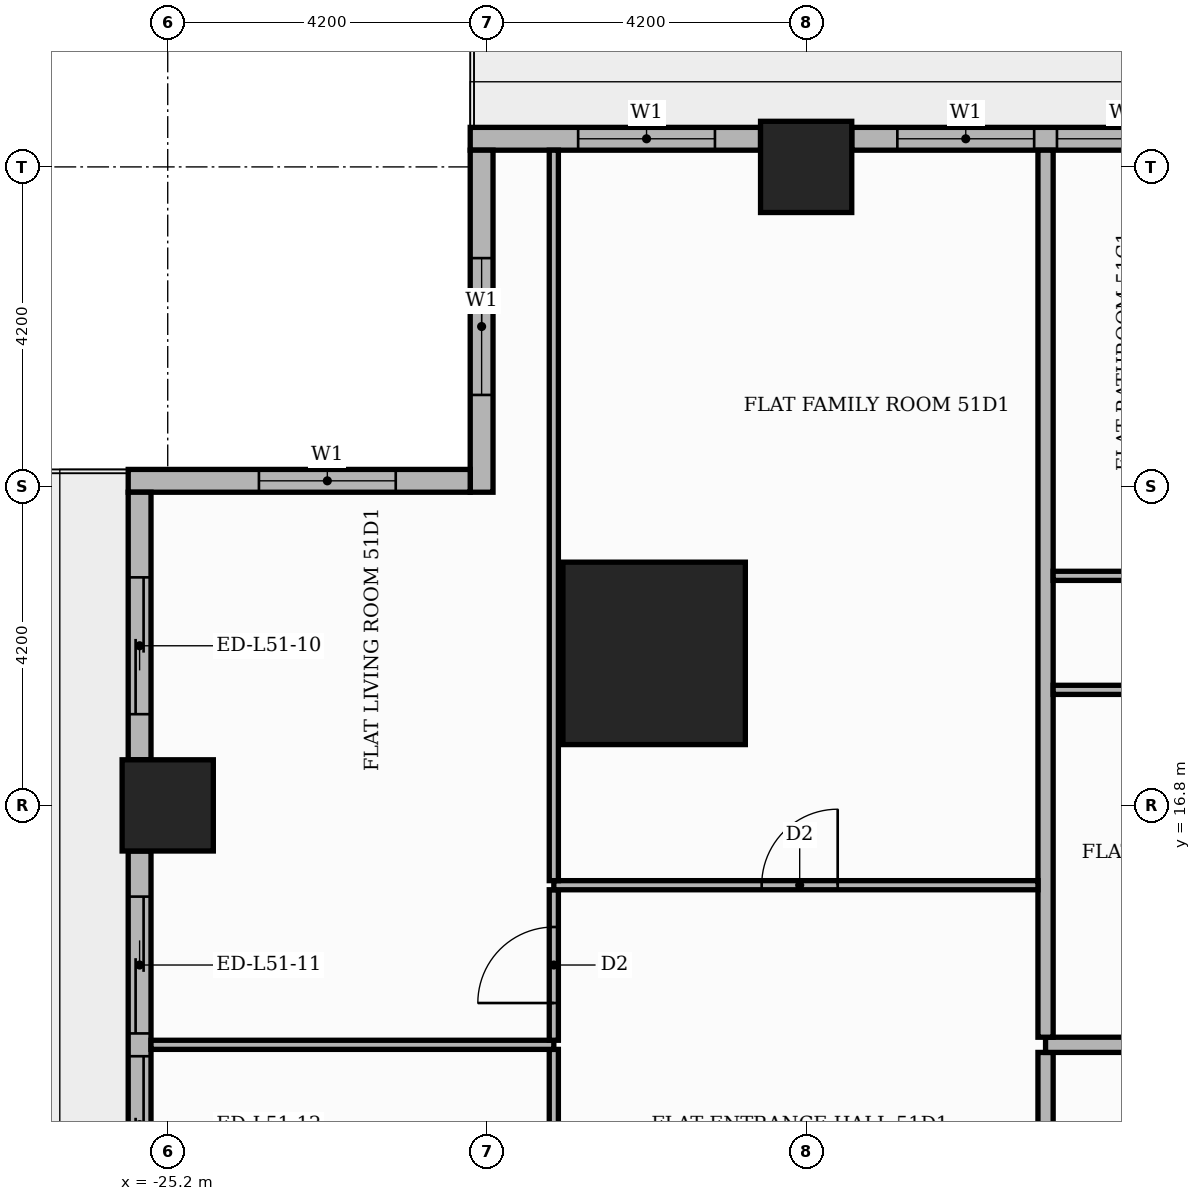
"""IFC4 building model, lengths in metres.
Left out: names, types, materials, properties, quantities, classifications, styles, units other than length and angle.
Written with IfcOpenShell. Run it as: python <this file> out.ifc"""

import sys

from ifc_helpers import new_model, si_unit, direction, frame, frame_2d, origin, origin_2d, place, context, subcontext, project, spatial, rectangle, extrude, element, fill, save


model = new_model("IFC4")
c1 = context("Model", 3, precision=1e-05, world=origin(), true_north=direction((0.0, 1.0)))
c2 = subcontext(c1, "Body", "Model", "MODEL_VIEW")
j1 = project(units=[si_unit("LENGTHUNIT", "METRE"), si_unit("PLANEANGLEUNIT", "RADIAN")], contexts=[c1])
p1 = place(None, origin())
s1 = spatial("IfcSite", under=j1, at=p1, CompositionType="ELEMENT")
p2 = place(p1, origin())
s2 = spatial("IfcBuilding", under=s1, at=p2, CompositionType="ELEMENT")
p3 = place(p2, frame((0.0, 0.0, 215.7)))
s3 = spatial("IfcBuildingStorey", under=s2, at=p3, CompositionType="ELEMENT", Elevation=215.7)
p4 = place(p3, frame((-18.8, 18.8, 0.0), z_axis=(0.0, 0.0, 1.0), x_axis=(1.0, 0.0, 0.0)))
e1 = element("IfcColumn", 1, at=p4, inside=s3, PredefinedType="COLUMN", context=c2, shape_type="SweptSolid", body=[
    extrude(rectangle(XDim=2.4, YDim=2.4, at=origin_2d()), origin(), (0.0, 0.0, 1.0), 3.9),
])
for number, where, z_axis, x_axis in (
    (2, (-16.8, 25.2, 0.0), (0.0, 0.0, 1.0), (1.0, 0.0, 0.0)),
    (3, (-25.2, 16.8, 0.0), (0.0, 0.0, 1.0), (1.0, 0.0, 0.0)),
):
    element("IfcColumn", number, at=place(p3, frame(where, z_axis=z_axis, x_axis=x_axis)), inside=s3, PredefinedType="COLUMN", context=c2, shape_type="SweptSolid", body=[
        extrude(rectangle(XDim=1.2, YDim=1.2, at=origin_2d()), origin(), (0.0, 0.0, 1.0), 3.9),
    ])
p5 = place(p3, frame((-9.0, 25.57, 0.0), z_axis=(0.0, 0.0, 1.0), x_axis=(-1.0, 0.0, 0.0)))
e4 = element("IfcWall", 4, at=p5, inside=s3, PredefinedType="STANDARD", context=c2, shape_type="SweptSolid", body=[
    extrude(rectangle(XDim=7.2, YDim=0.3, at=frame_2d((3.6, 0.0))), origin(), (0.0, 0.0, 1.0), 3.48),
])
p6 = place(p5, frame((0.6, 0.0, 0.9)))
e5 = element("IfcOpeningElement", 5, at=p6, cuts=e4, PredefinedType="OPENING", context=c2, shape_type="SweptSolid", body=[
    extrude(rectangle(XDim=1.8, YDim=2.1, at=frame_2d((0.9, 1.05))), frame((0.0, 0.16, 0.0), z_axis=(0.0, -1.0, 0.0), x_axis=(1.0, 0.0, 0.0)), (0.0, 0.0, 1.0), 0.32),
])
p7 = place(p5, frame((2.7, 0.0, 0.9)))
e6 = element("IfcOpeningElement", 6, at=p7, cuts=e4, PredefinedType="OPENING", context=c2, shape_type="SweptSolid", body=[
    extrude(rectangle(XDim=1.8, YDim=2.1, at=frame_2d((0.9, 1.05))), frame((0.0, 0.16, 0.0), z_axis=(0.0, -1.0, 0.0), x_axis=(1.0, 0.0, 0.0)), (0.0, 0.0, 1.0), 0.32),
])
p8 = place(p5, frame((4.8, 0.0, 0.9)))
e7 = element("IfcOpeningElement", 7, at=p8, cuts=e4, PredefinedType="OPENING", context=c2, shape_type="SweptSolid", body=[
    extrude(rectangle(XDim=1.8, YDim=2.1, at=frame_2d((0.9, 1.05))), frame((0.0, 0.16, 0.0), z_axis=(0.0, -1.0, 0.0), x_axis=(1.0, 0.0, 0.0)), (0.0, 0.0, 1.0), 0.32),
])
p9 = place(p3, frame((-17.4, 25.57, 0.0), z_axis=(0.0, 0.0, 1.0), x_axis=(-1.0, 0.0, 0.0)))
e8 = element("IfcWall", 8, at=p9, inside=s3, PredefinedType="STANDARD", context=c2, shape_type="SweptSolid", body=[
    extrude(rectangle(XDim=3.82, YDim=0.3, at=frame_2d((1.91, 0.0))), origin(), (0.0, 0.0, 1.0), 3.48),
])
p10 = place(p9, frame((0.6, 0.0, 0.9)))
e9 = element("IfcOpeningElement", 9, at=p10, cuts=e8, PredefinedType="OPENING", context=c2, shape_type="SweptSolid", body=[
    extrude(rectangle(XDim=1.8, YDim=2.1, at=frame_2d((0.9, 1.05))), frame((0.0, 0.16, 0.0), z_axis=(0.0, -1.0, 0.0), x_axis=(1.0, 0.0, 0.0)), (0.0, 0.0, 1.0), 0.32),
])
p11 = place(p3, frame((-21.07, 25.42, 0.0), z_axis=(0.0, 0.0, 1.0), x_axis=(0.0, -1.0, 0.0)))
e10 = element("IfcWall", 10, at=p11, inside=s3, PredefinedType="STANDARD", context=c2, shape_type="SweptSolid", body=[
    extrude(rectangle(XDim=4.5, YDim=0.3, at=frame_2d((2.25, 0.0))), origin(), (0.0, 0.0, 1.0), 3.48),
])
p12 = place(p11, frame((1.42, 0.0, 0.9)))
e11 = element("IfcOpeningElement", 11, at=p12, cuts=e10, PredefinedType="OPENING", context=c2, shape_type="SweptSolid", body=[
    extrude(rectangle(XDim=1.8, YDim=2.1, at=frame_2d((0.9, 1.05))), frame((0.0, 0.16, 0.0), z_axis=(0.0, -1.0, 0.0), x_axis=(1.0, 0.0, 0.0)), (0.0, 0.0, 1.0), 0.32),
])
p13 = place(p3, frame((-21.22, 21.07, 0.0), z_axis=(0.0, 0.0, 1.0), x_axis=(-1.0, 0.0, 0.0)))
e12 = element("IfcWall", 12, at=p13, inside=s3, PredefinedType="STANDARD", context=c2, shape_type="SweptSolid", body=[
    extrude(rectangle(XDim=4.5, YDim=0.3, at=frame_2d((2.25, 0.0))), origin(), (0.0, 0.0, 1.0), 3.48),
])
p14 = place(p13, frame((0.98, 0.0, 0.9)))
e13 = element("IfcOpeningElement", 13, at=p14, cuts=e12, PredefinedType="OPENING", context=c2, shape_type="SweptSolid", body=[
    extrude(rectangle(XDim=1.8, YDim=2.1, at=frame_2d((0.9, 1.05))), frame((0.0, 0.16, 0.0), z_axis=(0.0, -1.0, 0.0), x_axis=(1.0, 0.0, 0.0)), (0.0, 0.0, 1.0), 0.32),
])
p15 = place(p3, frame((-25.57, 20.92, 0.0), z_axis=(0.0, 0.0, 1.0), x_axis=(0.0, -1.0, 0.0)))
e14 = element("IfcWall", 14, at=p15, inside=s3, PredefinedType="STANDARD", context=c2, shape_type="SweptSolid", body=[
    extrude(rectangle(XDim=3.52, YDim=0.3, at=frame_2d((1.76, 0.0))), origin(), (0.0, 0.0, 1.0), 3.48),
])
p16 = place(p15, frame((1.12, 0.0, 0.0)))
e15 = element("IfcOpeningElement", 15, at=p16, cuts=e14, PredefinedType="OPENING", context=c2, shape_type="SweptSolid", body=[
    extrude(rectangle(XDim=1.8, YDim=2.4, at=frame_2d((0.9, 1.2))), frame((0.0, 0.16, 0.0), z_axis=(0.0, -1.0, 0.0), x_axis=(1.0, 0.0, 0.0)), (0.0, 0.0, 1.0), 0.32),
])
p17 = place(p3, frame((-25.57, 16.2, 0.0), z_axis=(0.0, 0.0, 1.0), x_axis=(0.0, -1.0, 0.0)))
e16 = element("IfcWall", 16, at=p17, inside=s3, PredefinedType="STANDARD", context=c2, shape_type="SweptSolid", body=[
    extrude(rectangle(XDim=7.2, YDim=0.3, at=frame_2d((3.6, 0.0))), origin(), (0.0, 0.0, 1.0), 3.48),
])
p18 = place(p17, frame((0.6, 0.0, 0.0)))
e17 = element("IfcOpeningElement", 17, at=p18, cuts=e16, PredefinedType="OPENING", context=c2, shape_type="SweptSolid", body=[
    extrude(rectangle(XDim=1.8, YDim=2.4, at=frame_2d((0.9, 1.2))), frame((0.0, 0.16, 0.0), z_axis=(0.0, -1.0, 0.0), x_axis=(1.0, 0.0, 0.0)), (0.0, 0.0, 1.0), 0.32),
])
p19 = place(p17, frame((2.7, 0.0, 0.0)))
e18 = element("IfcOpeningElement", 18, at=p19, cuts=e16, PredefinedType="OPENING", context=c2, shape_type="SweptSolid", body=[
    extrude(rectangle(XDim=1.8, YDim=2.4, at=frame_2d((0.9, 1.2))), frame((0.0, 0.16, 0.0), z_axis=(0.0, -1.0, 0.0), x_axis=(1.0, 0.0, 0.0)), (0.0, 0.0, 1.0), 0.32),
])
p20 = place(p17, frame((4.8, 0.0, 0.9)))
e19 = element("IfcOpeningElement", 19, at=p20, cuts=e16, PredefinedType="OPENING", context=c2, shape_type="SweptSolid", body=[
    extrude(rectangle(XDim=1.8, YDim=2.1, at=frame_2d((0.9, 1.05))), frame((0.0, 0.16, 0.0), z_axis=(0.0, -1.0, 0.0), x_axis=(1.0, 0.0, 0.0)), (0.0, 0.0, 1.0), 0.32),
])
p21 = place(p3, frame((-13.65, 5.35, 0.0), z_axis=(0.0, 0.0, 1.0), x_axis=(0.0, 1.0, 0.0)))
e20 = element("IfcWall", 20, at=p21, inside=s3, PredefinedType="PARTITIONING", context=c2, shape_type="SweptSolid", body=[
    extrude(rectangle(XDim=8.2, YDim=0.2, at=frame_2d((4.1, 0.0))), origin(), (0.0, 0.0, 1.0), 3.48),
])
p22 = place(p21, frame((5.65, 0.0, 0.0)))
e21 = element("IfcOpeningElement", 21, at=p22, cuts=e20, PredefinedType="OPENING", context=c2, shape_type="SweptSolid", body=[
    extrude(rectangle(XDim=1.1, YDim=2.4, at=frame_2d((0.55, 1.2))), frame((0.0, 0.11, 0.0), z_axis=(0.0, -1.0, 0.0), x_axis=(1.0, 0.0, 0.0)), (0.0, 0.0, 1.0), 0.22),
])
p23 = place(p3, frame((-20.12, 9.51, 0.0), z_axis=(0.0, 0.0, 1.0), x_axis=(0.0, 1.0, 0.0)))
e22 = element("IfcWall", 22, at=p23, inside=s3, PredefinedType="PARTITIONING", context=c2, shape_type="SweptSolid", body=[
    extrude(rectangle(XDim=4.08, YDim=0.12, at=frame_2d((2.04, 0.0))), origin(), (0.0, 0.0, 1.0), 3.48),
])
p24 = place(p23, frame((1.59, 0.0, 0.0)))
e23 = element("IfcOpeningElement", 23, at=p24, cuts=e22, PredefinedType="OPENING", context=c2, shape_type="SweptSolid", body=[
    extrude(rectangle(XDim=0.9, YDim=2.1, at=frame_2d((0.45, 1.05))), frame((0.0, 0.07, 0.0), z_axis=(0.0, -1.0, 0.0), x_axis=(1.0, 0.0, 0.0)), (0.0, 0.0, 1.0), 0.14),
])
p25 = place(p3, frame((-25.42, 13.65, 0.0), z_axis=(0.0, 0.0, 1.0), x_axis=(1.0, 0.0, 0.0)))
e24 = element("IfcWall", 24, at=p25, inside=s3, PredefinedType="PARTITIONING", context=c2, shape_type="SweptSolid", body=[
    extrude(rectangle(XDim=5.3, YDim=0.12, at=frame_2d((2.65, 0.0))), origin(), (0.0, 0.0, 1.0), 3.48),
])
p26 = place(p3, frame((-13.65, 13.65, 0.0), z_axis=(0.0, 0.0, 1.0), x_axis=(1.0, 0.0, 0.0)))
e25 = element("IfcWall", 25, at=p26, inside=s3, PredefinedType="PARTITIONING", context=c2, shape_type="SweptSolid", body=[
    extrude(rectangle(XDim=39.07, YDim=0.2, at=frame_2d((19.535, 0.0))), origin(), (0.0, 0.0, 1.0), 3.48),
])
p27 = place(p26, frame((24.65, 0.0, 0.0)))
e26 = element("IfcOpeningElement", 26, at=p27, cuts=e25, PredefinedType="OPENING", context=c2, shape_type="SweptSolid", body=[
    extrude(rectangle(XDim=1.1, YDim=2.4, at=frame_2d((0.55, 1.2))), frame((0.0, 0.11, 0.0), z_axis=(0.0, -1.0, 0.0), x_axis=(1.0, 0.0, 0.0)), (0.0, 0.0, 1.0), 0.22),
])
p28 = place(p3, frame((-20.12, 13.71, 0.0), z_axis=(0.0, 0.0, 1.0), x_axis=(0.0, 1.0, 0.0)))
e27 = element("IfcWall", 27, at=p28, inside=s3, PredefinedType="PARTITIONING", context=c2, shape_type="SweptSolid", body=[
    extrude(rectangle(XDim=1.98, YDim=0.12, at=frame_2d((0.99, 0.0))), origin(), (0.0, 0.0, 1.0), 3.48),
])
p29 = place(p28, frame((0.49, 0.0, 0.0)))
e28 = element("IfcOpeningElement", 28, at=p29, cuts=e27, PredefinedType="OPENING", context=c2, shape_type="SweptSolid", body=[
    extrude(rectangle(XDim=1.0, YDim=2.1, at=frame_2d((0.5, 1.05))), frame((0.0, 0.07, 0.0), z_axis=(0.0, -1.0, 0.0), x_axis=(1.0, 0.0, 0.0)), (0.0, 0.0, 1.0), 0.14),
])
p30 = place(p3, frame((-13.65, 13.75, 0.0), z_axis=(0.0, 0.0, 1.0), x_axis=(0.0, 1.0, 0.0)))
e29 = element("IfcWall", 29, at=p30, inside=s3, PredefinedType="PARTITIONING", context=c2, shape_type="SweptSolid", body=[
    extrude(rectangle(XDim=11.67, YDim=0.2, at=frame_2d((5.835, 0.0))), origin(), (0.0, 0.0, 1.0), 3.48),
])
p31 = place(p3, frame((-20.12, 15.75, 0.0), z_axis=(0.0, 0.0, 1.0), x_axis=(1.0, 0.0, 0.0)))
e30 = element("IfcWall", 30, at=p31, inside=s3, PredefinedType="PARTITIONING", context=c2, shape_type="SweptSolid", body=[
    extrude(rectangle(XDim=6.37, YDim=0.12, at=frame_2d((3.185, 0.0))), origin(), (0.0, 0.0, 1.0), 3.48),
])
p32 = place(p31, frame((2.735, 0.0, 0.0)))
e31 = element("IfcOpeningElement", 31, at=p32, cuts=e30, PredefinedType="OPENING", context=c2, shape_type="SweptSolid", body=[
    extrude(rectangle(XDim=1.0, YDim=2.1, at=frame_2d((0.5, 1.05))), frame((0.0, 0.07, 0.0), z_axis=(0.0, -1.0, 0.0), x_axis=(1.0, 0.0, 0.0)), (0.0, 0.0, 1.0), 0.14),
])
p33 = place(p3, frame((-20.12, 15.81, 0.0), z_axis=(0.0, 0.0, 1.0), x_axis=(0.0, 1.0, 0.0)))
e32 = element("IfcWall", 32, at=p33, inside=s3, PredefinedType="PARTITIONING", context=c2, shape_type="SweptSolid", body=[
    extrude(rectangle(XDim=9.61, YDim=0.12, at=frame_2d((4.805, 0.0))), origin(), (0.0, 0.0, 1.0), 3.48),
])
p34 = place(p3, frame((-13.55, 18.32, 0.0), z_axis=(0.0, 0.0, 1.0), x_axis=(1.0, 0.0, 0.0)))
e33 = element("IfcWall", 33, at=p34, inside=s3, PredefinedType="PARTITIONING", context=c2, shape_type="SweptSolid", body=[
    extrude(rectangle(XDim=23.0, YDim=0.12, at=frame_2d((11.5, 0.0))), origin(), (0.0, 0.0, 1.0), 3.48),
])
p35 = place(p34, frame((19.325, 0.0, 0.0)))
e34 = element("IfcOpeningElement", 34, at=p35, cuts=e33, PredefinedType="OPENING", context=c2, shape_type="SweptSolid", body=[
    extrude(rectangle(XDim=0.9, YDim=2.1, at=frame_2d((0.45, 1.05))), frame((0.0, 0.07, 0.0), z_axis=(0.0, -1.0, 0.0), x_axis=(1.0, 0.0, 0.0)), (0.0, 0.0, 1.0), 0.14),
])
p36 = place(p34, frame((14.0, 0.0, 0.0)))
e35 = element("IfcOpeningElement", 35, at=p36, cuts=e33, PredefinedType="OPENING", context=c2, shape_type="SweptSolid", body=[
    extrude(rectangle(XDim=0.9, YDim=2.1, at=frame_2d((0.45, 1.05))), frame((0.0, 0.07, 0.0), z_axis=(0.0, -1.0, 0.0), x_axis=(1.0, 0.0, 0.0)), (0.0, 0.0, 1.0), 0.14),
])
p37 = place(p34, frame((8.975, 0.0, 0.0)))
e36 = element("IfcOpeningElement", 36, at=p37, cuts=e33, PredefinedType="OPENING", context=c2, shape_type="SweptSolid", body=[
    extrude(rectangle(XDim=0.9, YDim=2.1, at=frame_2d((0.45, 1.05))), frame((0.0, 0.07, 0.0), z_axis=(0.0, -1.0, 0.0), x_axis=(1.0, 0.0, 0.0)), (0.0, 0.0, 1.0), 0.14),
])
p38 = place(p34, frame((4.925, 0.0, 0.0)))
e37 = element("IfcOpeningElement", 37, at=p38, cuts=e33, PredefinedType="OPENING", context=c2, shape_type="SweptSolid", body=[
    extrude(rectangle(XDim=0.9, YDim=2.1, at=frame_2d((0.45, 1.05))), frame((0.0, 0.07, 0.0), z_axis=(0.0, -1.0, 0.0), x_axis=(1.0, 0.0, 0.0)), (0.0, 0.0, 1.0), 0.14),
])
p39 = place(p34, frame((1.625, 0.0, 0.0)))
e38 = element("IfcOpeningElement", 38, at=p39, cuts=e33, PredefinedType="OPENING", context=c2, shape_type="SweptSolid", body=[
    extrude(rectangle(XDim=0.9, YDim=2.1, at=frame_2d((0.45, 1.05))), frame((0.0, 0.07, 0.0), z_axis=(0.0, -1.0, 0.0), x_axis=(1.0, 0.0, 0.0)), (0.0, 0.0, 1.0), 0.14),
])
p40 = place(p3, frame((-13.55, 19.82, 0.0), z_axis=(0.0, 0.0, 1.0), x_axis=(1.0, 0.0, 0.0)))
e39 = element("IfcWall", 39, at=p40, inside=s3, PredefinedType="PARTITIONING", context=c2, shape_type="SweptSolid", body=[
    extrude(rectangle(XDim=31.15, YDim=0.12, at=frame_2d((15.575, 0.0))), origin(), (0.0, 0.0, 1.0), 3.48),
])
p41 = place(p40, frame((26.7, 0.0, 0.0)))
e40 = element("IfcOpeningElement", 40, at=p41, cuts=e39, PredefinedType="OPENING", context=c2, shape_type="SweptSolid", body=[
    extrude(rectangle(XDim=1.0, YDim=2.1, at=frame_2d((0.5, 1.05))), frame((0.0, 0.07, 0.0), z_axis=(0.0, -1.0, 0.0), x_axis=(1.0, 0.0, 0.0)), (0.0, 0.0, 1.0), 0.14),
])
p42 = place(p40, frame((20.4, 0.0, 0.0)))
e41 = element("IfcOpeningElement", 41, at=p42, cuts=e39, PredefinedType="OPENING", context=c2, shape_type="SweptSolid", body=[
    extrude(rectangle(XDim=1.0, YDim=2.1, at=frame_2d((0.5, 1.05))), frame((0.0, 0.07, 0.0), z_axis=(0.0, -1.0, 0.0), x_axis=(1.0, 0.0, 0.0)), (0.0, 0.0, 1.0), 0.14),
])
p43 = place(p40, frame((13.1, 0.0, 0.0)))
e42 = element("IfcOpeningElement", 42, at=p43, cuts=e39, PredefinedType="OPENING", context=c2, shape_type="SweptSolid", body=[
    extrude(rectangle(XDim=0.9, YDim=2.1, at=frame_2d((0.45, 1.05))), frame((0.0, 0.07, 0.0), z_axis=(0.0, -1.0, 0.0), x_axis=(1.0, 0.0, 0.0)), (0.0, 0.0, 1.0), 0.14),
])
p44 = place(p40, frame((3.65, 0.0, 0.0)))
e43 = element("IfcOpeningElement", 43, at=p44, cuts=e39, PredefinedType="OPENING", context=c2, shape_type="SweptSolid", body=[
    extrude(rectangle(XDim=0.9, YDim=2.1, at=frame_2d((0.45, 1.05))), frame((0.0, 0.07, 0.0), z_axis=(0.0, -1.0, 0.0), x_axis=(1.0, 0.0, 0.0)), (0.0, 0.0, 1.0), 0.14),
])
p45 = place(p7, origin())
e44 = element("IfcWindow", 44, at=p45, inside=s3, PartitioningType="SINGLE_PANEL", PredefinedType="WINDOW", context=c2, shape_type="SweptSolid", body=[
    extrude(rectangle(XDim=1.8, YDim=2.1, at=frame_2d((0.9, 1.05))), frame((0.0, 0.03, 0.0), z_axis=(0.0, -1.0, 0.0), x_axis=(1.0, 0.0, 0.0)), (0.0, 0.0, 1.0), 0.06),
])
fill(e6, e44)
p46 = place(p8, origin())
e45 = element("IfcWindow", 45, at=p46, inside=s3, PartitioningType="SINGLE_PANEL", PredefinedType="WINDOW", context=c2, shape_type="SweptSolid", body=[
    extrude(rectangle(XDim=1.8, YDim=2.1, at=frame_2d((0.9, 1.05))), frame((0.0, 0.03, 0.0), z_axis=(0.0, -1.0, 0.0), x_axis=(1.0, 0.0, 0.0)), (0.0, 0.0, 1.0), 0.06),
])
fill(e7, e45)
p47 = place(p10, origin())
e46 = element("IfcWindow", 46, at=p47, inside=s3, PartitioningType="SINGLE_PANEL", PredefinedType="WINDOW", context=c2, shape_type="SweptSolid", body=[
    extrude(rectangle(XDim=1.8, YDim=2.1, at=frame_2d((0.9, 1.05))), frame((0.0, 0.03, 0.0), z_axis=(0.0, -1.0, 0.0), x_axis=(1.0, 0.0, 0.0)), (0.0, 0.0, 1.0), 0.06),
])
fill(e9, e46)
p48 = place(p12, origin())
e47 = element("IfcWindow", 47, at=p48, inside=s3, PartitioningType="SINGLE_PANEL", PredefinedType="WINDOW", context=c2, shape_type="SweptSolid", body=[
    extrude(rectangle(XDim=1.8, YDim=2.1, at=frame_2d((0.9, 1.05))), frame((0.0, 0.03, 0.0), z_axis=(0.0, -1.0, 0.0), x_axis=(1.0, 0.0, 0.0)), (0.0, 0.0, 1.0), 0.06),
])
fill(e11, e47)
p49 = place(p14, origin())
e48 = element("IfcWindow", 48, at=p49, inside=s3, PartitioningType="SINGLE_PANEL", PredefinedType="WINDOW", context=c2, shape_type="SweptSolid", body=[
    extrude(rectangle(XDim=1.8, YDim=2.1, at=frame_2d((0.9, 1.05))), frame((0.0, 0.03, 0.0), z_axis=(0.0, -1.0, 0.0), x_axis=(1.0, 0.0, 0.0)), (0.0, 0.0, 1.0), 0.06),
])
fill(e13, e48)
p50 = place(p16, origin())
e49 = element("IfcDoor", 49, at=p50, inside=s3, OperationType="SLIDING_TO_RIGHT", PredefinedType="DOOR", context=c2, shape_type="SweptSolid", body=[
    extrude(rectangle(XDim=1.8, YDim=2.4, at=frame_2d((0.9, 1.2))), frame((0.0, 0.025, 0.0), z_axis=(0.0, -1.0, 0.0), x_axis=(1.0, 0.0, 0.0)), (0.0, 0.0, 1.0), 0.05),
])
fill(e15, e49)
p51 = place(p18, origin())
e50 = element("IfcDoor", 50, at=p51, inside=s3, OperationType="SLIDING_TO_LEFT", PredefinedType="DOOR", context=c2, shape_type="SweptSolid", body=[
    extrude(rectangle(XDim=1.8, YDim=2.4, at=frame_2d((0.9, 1.2))), frame((0.0, 0.025, 0.0), z_axis=(0.0, -1.0, 0.0), x_axis=(1.0, 0.0, 0.0)), (0.0, 0.0, 1.0), 0.05),
])
fill(e17, e50)
p52 = place(p19, origin())
e51 = element("IfcDoor", 51, at=p52, inside=s3, OperationType="SLIDING_TO_RIGHT", PredefinedType="DOOR", context=c2, shape_type="SweptSolid", body=[
    extrude(rectangle(XDim=1.8, YDim=2.4, at=frame_2d((0.9, 1.2))), frame((0.0, 0.025, 0.0), z_axis=(0.0, -1.0, 0.0), x_axis=(1.0, 0.0, 0.0)), (0.0, 0.0, 1.0), 0.05),
])
fill(e18, e51)
p53 = place(p32, origin())
e52 = element("IfcDoor", 52, at=p53, inside=s3, OperationType="SINGLE_SWING_RIGHT", PredefinedType="DOOR", context=c2, shape_type="SweptSolid", body=[
    extrude(rectangle(XDim=1.0, YDim=2.1, at=frame_2d((0.5, 1.05))), frame((0.0, 0.025, 0.0), z_axis=(0.0, -1.0, 0.0), x_axis=(1.0, 0.0, 0.0)), (0.0, 0.0, 1.0), 0.05),
])
fill(e31, e52)
p54 = place(p29, origin())
e53 = element("IfcDoor", 53, at=p54, inside=s3, OperationType="SINGLE_SWING_LEFT", PredefinedType="DOOR", context=c2, shape_type="SweptSolid", body=[
    extrude(rectangle(XDim=1.0, YDim=2.1, at=frame_2d((0.5, 1.05))), frame((0.0, 0.025, 0.0), z_axis=(0.0, -1.0, 0.0), x_axis=(1.0, 0.0, 0.0)), (0.0, 0.0, 1.0), 0.05),
])
fill(e28, e53)
save(model, sys.argv[1])
